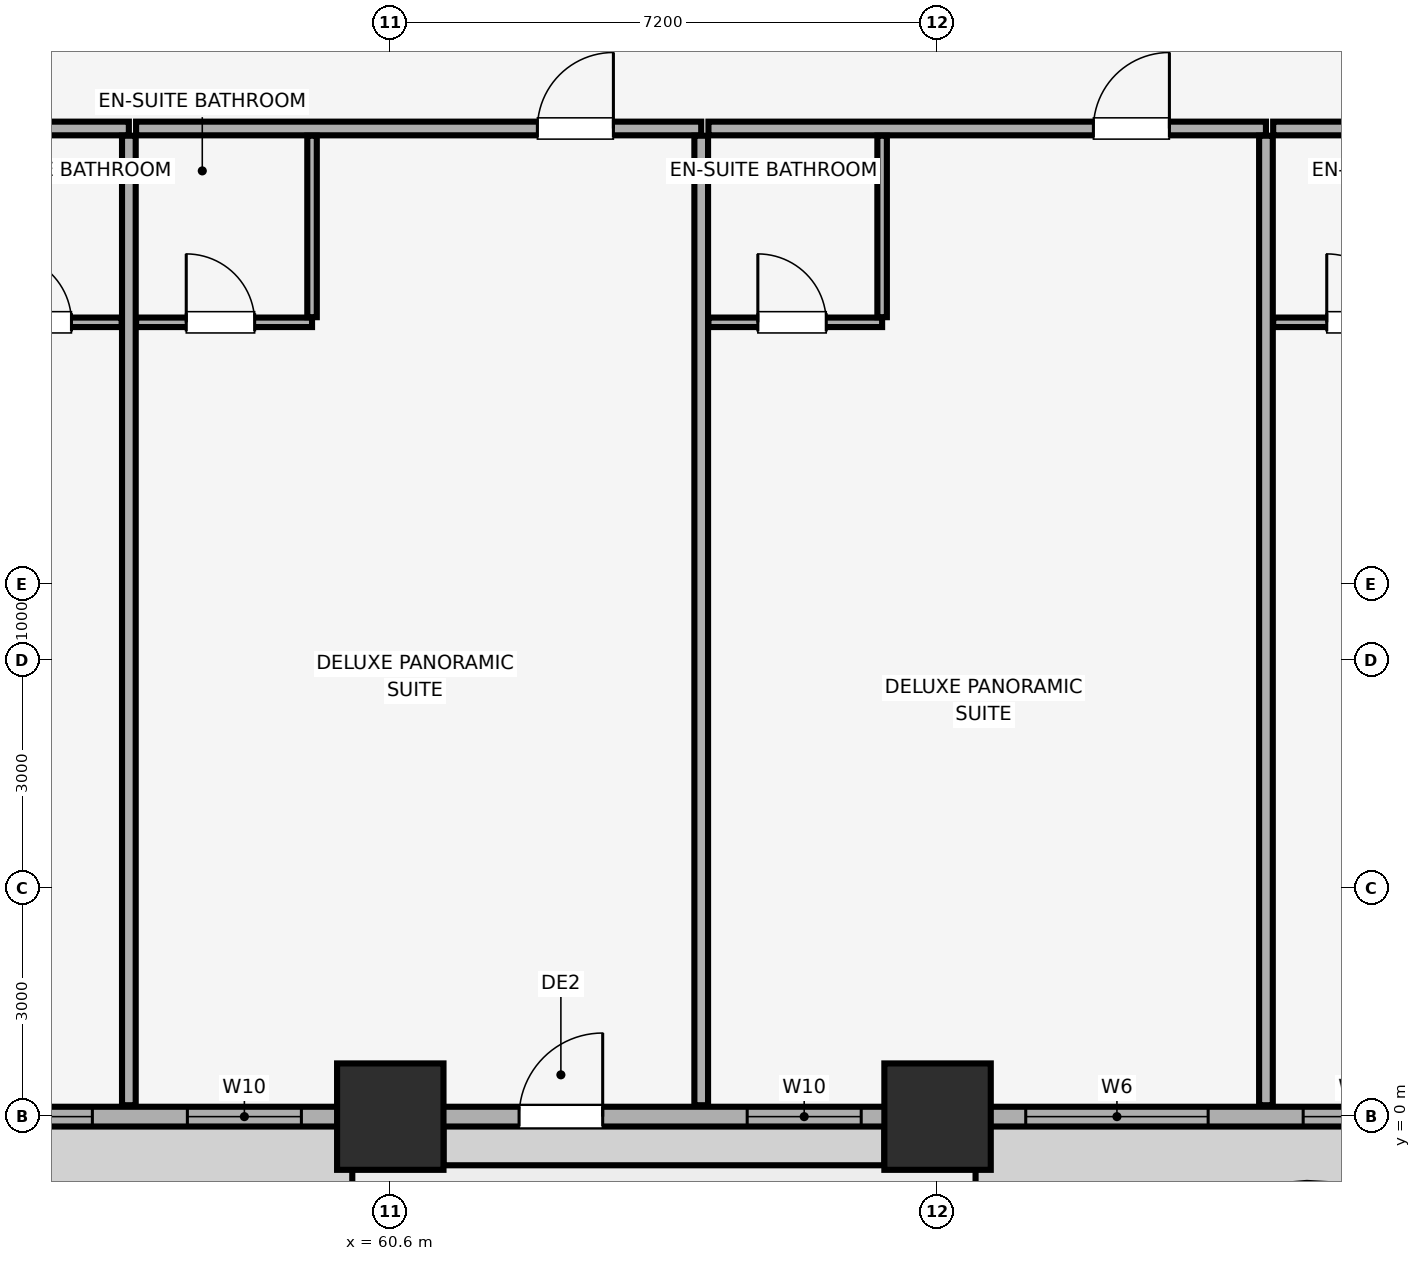
"""IFC4 building model, lengths in metres.
Left out: names, types, materials, properties, quantities, classifications, styles, units other than length and angle.
Written with IfcOpenShell. Run it as: python <this file> out.ifc"""

import sys

from ifc_helpers import new_model, si_unit, direction, frame, frame_2d, origin, origin_2d, place, context, subcontext, project, spatial, rectangle, extrude, element, fill, save


model = new_model("IFC4")
c1 = context("Model", 3, precision=1e-05, world=origin(), true_north=direction((0.0, 1.0)))
c2 = subcontext(c1, "Body", "Model", "MODEL_VIEW")
j1 = project(units=[si_unit("LENGTHUNIT", "METRE"), si_unit("PLANEANGLEUNIT", "RADIAN")], contexts=[c1])
p1 = place(None, origin())
s1 = spatial("IfcSite", under=j1, at=p1, CompositionType="ELEMENT")
p2 = place(p1, origin())
s2 = spatial("IfcBuilding", under=s1, at=p2, CompositionType="ELEMENT")
p3 = place(p2, frame((0.0, 0.0, 68.9)))
s3 = spatial("IfcBuildingStorey", under=s2, at=p3, CompositionType="ELEMENT", Elevation=68.9)
for number, where, z_axis, x_axis in (
    (1, (60.6, 0.0, 0.0), (0.0, 0.0, 1.0), (1.0, 0.0, 0.0)),
    (2, (67.8, 0.0, 0.0), (0.0, 0.0, 1.0), (1.0, 0.0, 0.0)),
):
    element("IfcColumn", number, at=place(p3, frame(where, z_axis=z_axis, x_axis=x_axis)), inside=s3, PredefinedType="COLUMN", context=c2, shape_type="SweptSolid", body=[
        extrude(rectangle(XDim=1.4, YDim=1.4, at=origin_2d()), origin(), (0.0, 0.0, 1.0), 3.51),
    ])
p4 = place(p3, frame((4.2, 0.0, 0.0), z_axis=(0.0, 0.0, 1.0), x_axis=(1.0, 0.0, 0.0)))
e3 = element("IfcWall", 3, at=p4, inside=s3, PredefinedType="SOLIDWALL", context=c2, shape_type="SweptSolid", body=[
    extrude(rectangle(XDim=75.6, YDim=0.26, at=frame_2d((37.8, 0.0))), origin(), (0.0, 0.0, 1.0), 2.56),
])
p5 = place(p4, frame((13.517, 0.0, 0.0)))
e4 = element("IfcOpeningElement", 4, at=p5, cuts=e3, PredefinedType="OPENING", context=c2, shape_type="SweptSolid", body=[
    extrude(rectangle(XDim=1.1, YDim=2.15, at=frame_2d((0.55, 1.075))), frame((0.0, 0.14, 0.0), z_axis=(0.0, -1.0, 0.0), x_axis=(1.0, 0.0, 0.0)), (0.0, 0.0, 1.0), 0.28),
])
p6 = place(p4, frame((28.183, 0.0, 0.0)))
e5 = element("IfcOpeningElement", 5, at=p6, cuts=e3, PredefinedType="OPENING", context=c2, shape_type="SweptSolid", body=[
    extrude(rectangle(XDim=1.1, YDim=2.15, at=frame_2d((0.55, 1.075))), frame((0.0, 0.14, 0.0), z_axis=(0.0, -1.0, 0.0), x_axis=(1.0, 0.0, 0.0)), (0.0, 0.0, 1.0), 0.28),
])
p7 = place(p4, frame((58.094, 0.0, 0.0)))
e6 = element("IfcOpeningElement", 6, at=p7, cuts=e3, PredefinedType="OPENING", context=c2, shape_type="SweptSolid", body=[
    extrude(rectangle(XDim=1.1, YDim=2.15, at=frame_2d((0.55, 1.075))), frame((0.0, 0.14, 0.0), z_axis=(0.0, -1.0, 0.0), x_axis=(1.0, 0.0, 0.0)), (0.0, 0.0, 1.0), 0.28),
])
p8 = place(p4, frame((1.035, 0.0, 0.85)))
e7 = element("IfcOpeningElement", 7, at=p8, cuts=e3, PredefinedType="OPENING", context=c2, shape_type="SweptSolid", body=[
    extrude(rectangle(XDim=2.4, YDim=1.5, at=frame_2d((1.2, 0.75))), frame((0.0, 0.14, 0.0), z_axis=(0.0, -1.0, 0.0), x_axis=(1.0, 0.0, 0.0)), (0.0, 0.0, 1.0), 0.28),
])
p9 = place(p4, frame((5.74, 0.0, 0.85)))
e8 = element("IfcOpeningElement", 8, at=p9, cuts=e3, PredefinedType="OPENING", context=c2, shape_type="SweptSolid", body=[
    extrude(rectangle(XDim=1.5, YDim=1.4, at=frame_2d((0.75, 0.7))), frame((0.0, 0.14, 0.0), z_axis=(0.0, -1.0, 0.0), x_axis=(1.0, 0.0, 0.0)), (0.0, 0.0, 1.0), 0.28),
])
p10 = place(p4, frame((8.49, 0.0, 0.85)))
e9 = element("IfcOpeningElement", 9, at=p10, cuts=e3, PredefinedType="OPENING", context=c2, shape_type="SweptSolid", body=[
    extrude(rectangle(XDim=2.4, YDim=1.5, at=frame_2d((1.2, 0.75))), frame((0.0, 0.14, 0.0), z_axis=(0.0, -1.0, 0.0), x_axis=(1.0, 0.0, 0.0)), (0.0, 0.0, 1.0), 0.28),
])
p11 = place(p4, frame((15.855, 0.0, 0.85)))
e10 = element("IfcOpeningElement", 10, at=p11, cuts=e3, PredefinedType="OPENING", context=c2, shape_type="SweptSolid", body=[
    extrude(rectangle(XDim=2.4, YDim=1.5, at=frame_2d((1.2, 0.75))), frame((0.0, 0.14, 0.0), z_axis=(0.0, -1.0, 0.0), x_axis=(1.0, 0.0, 0.0)), (0.0, 0.0, 1.0), 0.28),
])
p12 = place(p4, frame((20.02, 0.0, 0.85)))
e11 = element("IfcOpeningElement", 11, at=p12, cuts=e3, PredefinedType="OPENING", context=c2, shape_type="SweptSolid", body=[
    extrude(rectangle(XDim=2.4, YDim=1.5, at=frame_2d((1.2, 0.75))), frame((0.0, 0.14, 0.0), z_axis=(0.0, -1.0, 0.0), x_axis=(1.0, 0.0, 0.0)), (0.0, 0.0, 1.0), 0.28),
])
p13 = place(p4, frame((23.67, 0.0, 0.85)))
e12 = element("IfcOpeningElement", 12, at=p13, cuts=e3, PredefinedType="OPENING", context=c2, shape_type="SweptSolid", body=[
    extrude(rectangle(XDim=1.5, YDim=1.4, at=frame_2d((0.75, 0.7))), frame((0.0, 0.14, 0.0), z_axis=(0.0, -1.0, 0.0), x_axis=(1.0, 0.0, 0.0)), (0.0, 0.0, 1.0), 0.28),
])
p14 = place(p4, frame((31.035, 0.0, 0.85)))
e13 = element("IfcOpeningElement", 13, at=p14, cuts=e3, PredefinedType="OPENING", context=c2, shape_type="SweptSolid", body=[
    extrude(rectangle(XDim=1.5, YDim=1.4, at=frame_2d((0.75, 0.7))), frame((0.0, 0.14, 0.0), z_axis=(0.0, -1.0, 0.0), x_axis=(1.0, 0.0, 0.0)), (0.0, 0.0, 1.0), 0.28),
])
p15 = place(p4, frame((34.75, 0.0, 0.85)))
e14 = element("IfcOpeningElement", 14, at=p15, cuts=e3, PredefinedType="OPENING", context=c2, shape_type="SweptSolid", body=[
    extrude(rectangle(XDim=2.4, YDim=1.5, at=frame_2d((1.2, 0.75))), frame((0.0, 0.14, 0.0), z_axis=(0.0, -1.0, 0.0), x_axis=(1.0, 0.0, 0.0)), (0.0, 0.0, 1.0), 0.28),
])
p16 = place(p4, frame((38.55, 0.0, 0.85)))
e15 = element("IfcOpeningElement", 15, at=p16, cuts=e3, PredefinedType="OPENING", context=c2, shape_type="SweptSolid", body=[
    extrude(rectangle(XDim=2.4, YDim=1.5, at=frame_2d((1.2, 0.75))), frame((0.0, 0.14, 0.0), z_axis=(0.0, -1.0, 0.0), x_axis=(1.0, 0.0, 0.0)), (0.0, 0.0, 1.0), 0.28),
])
p17 = place(p4, frame((43.165, 0.0, 0.85)))
e16 = element("IfcOpeningElement", 16, at=p17, cuts=e3, PredefinedType="OPENING", context=c2, shape_type="SweptSolid", body=[
    extrude(rectangle(XDim=1.5, YDim=1.4, at=frame_2d((0.75, 0.7))), frame((0.0, 0.14, 0.0), z_axis=(0.0, -1.0, 0.0), x_axis=(1.0, 0.0, 0.0)), (0.0, 0.0, 1.0), 0.28),
])
p18 = place(p4, frame((45.915, 0.0, 0.85)))
e17 = element("IfcOpeningElement", 17, at=p18, cuts=e3, PredefinedType="OPENING", context=c2, shape_type="SweptSolid", body=[
    extrude(rectangle(XDim=2.4, YDim=1.5, at=frame_2d((1.2, 0.75))), frame((0.0, 0.14, 0.0), z_axis=(0.0, -1.0, 0.0), x_axis=(1.0, 0.0, 0.0)), (0.0, 0.0, 1.0), 0.28),
])
p19 = place(p4, frame((50.081, 0.0, 0.85)))
e18 = element("IfcOpeningElement", 18, at=p19, cuts=e3, PredefinedType="OPENING", context=c2, shape_type="SweptSolid", body=[
    extrude(rectangle(XDim=2.4, YDim=1.5, at=frame_2d((1.2, 0.75))), frame((0.0, 0.14, 0.0), z_axis=(0.0, -1.0, 0.0), x_axis=(1.0, 0.0, 0.0)), (0.0, 0.0, 1.0), 0.28),
])
p20 = place(p4, frame((53.73, 0.0, 0.85)))
e19 = element("IfcOpeningElement", 19, at=p20, cuts=e3, PredefinedType="OPENING", context=c2, shape_type="SweptSolid", body=[
    extrude(rectangle(XDim=1.5, YDim=1.4, at=frame_2d((0.75, 0.7))), frame((0.0, 0.14, 0.0), z_axis=(0.0, -1.0, 0.0), x_axis=(1.0, 0.0, 0.0)), (0.0, 0.0, 1.0), 0.28),
])
p21 = place(p4, frame((61.095, 0.0, 0.85)))
e20 = element("IfcOpeningElement", 20, at=p21, cuts=e3, PredefinedType="OPENING", context=c2, shape_type="SweptSolid", body=[
    extrude(rectangle(XDim=1.5, YDim=1.4, at=frame_2d((0.75, 0.7))), frame((0.0, 0.14, 0.0), z_axis=(0.0, -1.0, 0.0), x_axis=(1.0, 0.0, 0.0)), (0.0, 0.0, 1.0), 0.28),
])
p22 = place(p4, frame((64.76, 0.0, 0.85)))
e21 = element("IfcOpeningElement", 21, at=p22, cuts=e3, PredefinedType="OPENING", context=c2, shape_type="SweptSolid", body=[
    extrude(rectangle(XDim=2.4, YDim=1.5, at=frame_2d((1.2, 0.75))), frame((0.0, 0.14, 0.0), z_axis=(0.0, -1.0, 0.0), x_axis=(1.0, 0.0, 0.0)), (0.0, 0.0, 1.0), 0.28),
])
p23 = place(p4, frame((68.41, 0.0, 0.85)))
e22 = element("IfcOpeningElement", 22, at=p23, cuts=e3, PredefinedType="OPENING", context=c2, shape_type="SweptSolid", body=[
    extrude(rectangle(XDim=1.5, YDim=1.4, at=frame_2d((0.75, 0.7))), frame((0.0, 0.14, 0.0), z_axis=(0.0, -1.0, 0.0), x_axis=(1.0, 0.0, 0.0)), (0.0, 0.0, 1.0), 0.28),
])
p24 = place(p4, frame((72.165, 0.0, 0.85)))
e23 = element("IfcOpeningElement", 23, at=p24, cuts=e3, PredefinedType="OPENING", context=c2, shape_type="SweptSolid", body=[
    extrude(rectangle(XDim=2.4, YDim=1.5, at=frame_2d((1.2, 0.75))), frame((0.0, 0.14, 0.0), z_axis=(0.0, -1.0, 0.0), x_axis=(1.0, 0.0, 0.0)), (0.0, 0.0, 1.0), 0.28),
])
p25 = place(p3, frame((49.726, 13.0, 0.0), z_axis=(0.0, 0.0, 1.0), x_axis=(1.0, 0.0, 0.0)))
e24 = element("IfcWall", 24, at=p25, inside=s3, PredefinedType="PARTITIONING", context=c2, shape_type="SweptSolid", body=[
    extrude(rectangle(XDim=7.435, YDim=0.18, at=frame_2d((3.718, 0.0))), origin(), (0.0, 0.0, 1.0), 3.51),
])
p26 = place(p25, frame((0.9, 0.0, 0.0)))
e25 = element("IfcOpeningElement", 25, at=p26, cuts=e24, PredefinedType="OPENING", context=c2, shape_type="SweptSolid", body=[
    extrude(rectangle(XDim=1.0, YDim=2.15, at=frame_2d((0.5, 1.075))), frame((0.0, 0.1, 0.0), z_axis=(0.0, -1.0, 0.0), x_axis=(1.0, 0.0, 0.0)), (0.0, 0.0, 1.0), 0.2),
])
p27 = place(p3, frame((57.161, 0.15, 0.0), z_axis=(0.0, 0.0, 1.0), x_axis=(0.0, 1.0, 0.0)))
e26 = element("IfcWall", 26, at=p27, inside=s3, PredefinedType="PARTITIONING", context=c2, shape_type="SweptSolid", body=[
    extrude(rectangle(XDim=12.755, YDim=0.18, at=frame_2d((6.377, 0.0))), origin(), (0.0, 0.0, 1.0), 2.898),
])
p28 = place(p3, frame((54.75, 10.45, 0.0), z_axis=(0.0, 0.0, 1.0), x_axis=(1.0, 0.0, 0.0)))
e27 = element("IfcWall", 27, at=p28, inside=s3, PredefinedType="PARTITIONING", context=c2, shape_type="SweptSolid", body=[
    extrude(rectangle(XDim=2.315, YDim=0.125, at=frame_2d((1.158, 0.0))), origin(), (0.0, 0.0, 1.0), 3.51),
])
p29 = place(p28, frame((0.755, 0.0, 0.0)))
e28 = element("IfcOpeningElement", 28, at=p29, cuts=e27, PredefinedType="OPENING", context=c2, shape_type="SweptSolid", body=[
    extrude(rectangle(XDim=0.9, YDim=2.1, at=frame_2d((0.45, 1.05))), frame((0.0, 0.073, 0.0), z_axis=(0.0, -1.0, 0.0), x_axis=(1.0, 0.0, 0.0)), (0.0, 0.0, 1.0), 0.145),
])
p30 = place(p3, frame((57.256, 13.0, 0.0), z_axis=(0.0, 0.0, 1.0), x_axis=(1.0, 0.0, 0.0)))
e29 = element("IfcWall", 29, at=p30, inside=s3, PredefinedType="PARTITIONING", context=c2, shape_type="SweptSolid", body=[
    extrude(rectangle(XDim=7.435, YDim=0.18, at=frame_2d((3.718, 0.0))), origin(), (0.0, 0.0, 1.0), 3.51),
])
p31 = place(p30, frame((5.28, 0.0, 0.0)))
e30 = element("IfcOpeningElement", 30, at=p31, cuts=e29, PredefinedType="OPENING", context=c2, shape_type="SweptSolid", body=[
    extrude(rectangle(XDim=1.0, YDim=2.15, at=frame_2d((0.5, 1.075))), frame((0.0, 0.1, 0.0), z_axis=(0.0, -1.0, 0.0), x_axis=(1.0, 0.0, 0.0)), (0.0, 0.0, 1.0), 0.2),
])
p32 = place(p3, frame((64.691, 0.15, 0.0), z_axis=(0.0, 0.0, 1.0), x_axis=(0.0, 1.0, 0.0)))
e31 = element("IfcWall", 31, at=p32, inside=s3, PredefinedType="PARTITIONING", context=c2, shape_type="SweptSolid", body=[
    extrude(rectangle(XDim=12.755, YDim=0.18, at=frame_2d((6.377, 0.0))), origin(), (0.0, 0.0, 1.0), 3.51),
])
p33 = place(p3, frame((57.256, 10.45, 0.0), z_axis=(0.0, 0.0, 1.0), x_axis=(1.0, 0.0, 0.0)))
e32 = element("IfcWall", 32, at=p33, inside=s3, PredefinedType="PARTITIONING", context=c2, shape_type="SweptSolid", body=[
    extrude(rectangle(XDim=2.315, YDim=0.125, at=frame_2d((1.157, 0.0))), origin(), (0.0, 0.0, 1.0), 3.51),
])
p34 = place(p33, frame((0.66, 0.0, 0.0)))
e33 = element("IfcOpeningElement", 33, at=p34, cuts=e32, PredefinedType="OPENING", context=c2, shape_type="SweptSolid", body=[
    extrude(rectangle(XDim=0.9, YDim=2.1, at=frame_2d((0.45, 1.05))), frame((0.0, 0.073, 0.0), z_axis=(0.0, -1.0, 0.0), x_axis=(1.0, 0.0, 0.0)), (0.0, 0.0, 1.0), 0.145),
])
p35 = place(p3, frame((59.571, 10.518, 0.0), z_axis=(0.0, 0.0, 1.0), x_axis=(0.0, 1.0, 0.0)))
e34 = element("IfcWall", 34, at=p35, inside=s3, PredefinedType="PARTITIONING", context=c2, shape_type="SweptSolid", body=[
    extrude(rectangle(XDim=2.387, YDim=0.125, at=frame_2d((1.194, 0.0))), origin(), (0.0, 0.0, 1.0), 3.51),
])
p36 = place(p3, frame((64.786, 13.0, 0.0), z_axis=(0.0, 0.0, 1.0), x_axis=(1.0, 0.0, 0.0)))
e35 = element("IfcWall", 35, at=p36, inside=s3, PredefinedType="PARTITIONING", context=c2, shape_type="SweptSolid", body=[
    extrude(rectangle(XDim=7.335, YDim=0.18, at=frame_2d((3.667, 0.0))), origin(), (0.0, 0.0, 1.0), 3.51),
])
p37 = place(p36, frame((5.064, 0.0, 0.0)))
e36 = element("IfcOpeningElement", 36, at=p37, cuts=e35, PredefinedType="OPENING", context=c2, shape_type="SweptSolid", body=[
    extrude(rectangle(XDim=1.0, YDim=2.15, at=frame_2d((0.5, 1.075))), frame((0.0, 0.1, 0.0), z_axis=(0.0, -1.0, 0.0), x_axis=(1.0, 0.0, 0.0)), (0.0, 0.0, 1.0), 0.2),
])
p38 = place(p3, frame((72.12, 0.15, 0.0), z_axis=(0.0, 0.0, 1.0), x_axis=(0.0, 1.0, 0.0)))
e37 = element("IfcWall", 37, at=p38, inside=s3, PredefinedType="PARTITIONING", context=c2, shape_type="SweptSolid", body=[
    extrude(rectangle(XDim=12.755, YDim=0.18, at=frame_2d((6.377, 0.0))), origin(), (0.0, 0.0, 1.0), 3.51),
])
p39 = place(p3, frame((64.786, 10.45, 0.0), z_axis=(0.0, 0.0, 1.0), x_axis=(1.0, 0.0, 0.0)))
e38 = element("IfcWall", 38, at=p39, inside=s3, PredefinedType="PARTITIONING", context=c2, shape_type="SweptSolid", body=[
    extrude(rectangle(XDim=2.285, YDim=0.125, at=frame_2d((1.143, 0.0))), origin(), (0.0, 0.0, 1.0), 3.51),
])
p40 = place(p39, frame((0.65, 0.0, 0.0)))
e39 = element("IfcOpeningElement", 39, at=p40, cuts=e38, PredefinedType="OPENING", context=c2, shape_type="SweptSolid", body=[
    extrude(rectangle(XDim=0.9, YDim=2.1, at=frame_2d((0.45, 1.05))), frame((0.0, 0.073, 0.0), z_axis=(0.0, -1.0, 0.0), x_axis=(1.0, 0.0, 0.0)), (0.0, 0.0, 1.0), 0.145),
])
p41 = place(p3, frame((67.071, 10.518, 0.0), z_axis=(0.0, 0.0, 1.0), x_axis=(0.0, 1.0, 0.0)))
e40 = element("IfcWall", 40, at=p41, inside=s3, PredefinedType="PARTITIONING", context=c2, shape_type="SweptSolid", body=[
    extrude(rectangle(XDim=2.387, YDim=0.125, at=frame_2d((1.194, 0.0))), origin(), (0.0, 0.0, 1.0), 3.51),
])
p42 = place(p3, frame((72.215, 13.0, 0.0), z_axis=(0.0, 0.0, 1.0), x_axis=(1.0, 0.0, 0.0)))
e41 = element("IfcWall", 41, at=p42, inside=s3, PredefinedType="PARTITIONING", context=c2, shape_type="SweptSolid", body=[
    extrude(rectangle(XDim=11.635, YDim=0.18, at=frame_2d((5.817, 0.0))), origin(), (0.0, 0.0, 1.0), 3.51),
])
p43 = place(p42, frame((4.95, 0.0, 0.0)))
e42 = element("IfcOpeningElement", 42, at=p43, cuts=e41, PredefinedType="OPENING", context=c2, shape_type="SweptSolid", body=[
    extrude(rectangle(XDim=1.0, YDim=2.15, at=frame_2d((0.5, 1.075))), frame((0.0, 0.1, 0.0), z_axis=(0.0, -1.0, 0.0), x_axis=(1.0, 0.0, 0.0)), (0.0, 0.0, 1.0), 0.2),
])
p44 = place(p3, frame((72.215, 10.45, 0.0), z_axis=(0.0, 0.0, 1.0), x_axis=(1.0, 0.0, 0.0)))
e43 = element("IfcWall", 43, at=p44, inside=s3, PredefinedType="PARTITIONING", context=c2, shape_type="SweptSolid", body=[
    extrude(rectangle(XDim=2.405, YDim=0.125, at=frame_2d((1.203, 0.0))), origin(), (0.0, 0.0, 1.0), 3.51),
])
p45 = place(p44, frame((0.705, 0.0, 0.0)))
e44 = element("IfcOpeningElement", 44, at=p45, cuts=e43, PredefinedType="OPENING", context=c2, shape_type="SweptSolid", body=[
    extrude(rectangle(XDim=0.9, YDim=2.1, at=frame_2d((0.45, 1.05))), frame((0.0, 0.073, 0.0), z_axis=(0.0, -1.0, 0.0), x_axis=(1.0, 0.0, 0.0)), (0.0, 0.0, 1.0), 0.145),
])
p46 = place(p7, origin())
e45 = element("IfcDoor", 45, at=p46, inside=s3, OperationType="SINGLE_SWING_RIGHT", PredefinedType="DOOR", context=c2, shape_type="SweptSolid", body=[
    extrude(rectangle(XDim=1.1, YDim=2.15, at=frame_2d((0.55, 1.075))), frame((0.0, 0.025, 0.0), z_axis=(0.0, -1.0, 0.0), x_axis=(1.0, 0.0, 0.0)), (0.0, 0.0, 1.0), 0.05),
])
fill(e6, e45)
p47 = place(p19, origin())
e46 = element("IfcWindow", 46, at=p47, inside=s3, PartitioningType="SINGLE_PANEL", PredefinedType="WINDOW", context=c2, shape_type="SweptSolid", body=[
    extrude(rectangle(XDim=2.4, YDim=1.5, at=frame_2d((1.2, 0.75))), frame((0.0, 0.03, 0.0), z_axis=(0.0, -1.0, 0.0), x_axis=(1.0, 0.0, 0.0)), (0.0, 0.0, 1.0), 0.06),
])
fill(e18, e46)
p48 = place(p20, origin())
e47 = element("IfcWindow", 47, at=p48, inside=s3, PartitioningType="SINGLE_PANEL", PredefinedType="WINDOW", context=c2, shape_type="SweptSolid", body=[
    extrude(rectangle(XDim=1.5, YDim=1.4, at=frame_2d((0.75, 0.7))), frame((0.0, 0.03, 0.0), z_axis=(0.0, -1.0, 0.0), x_axis=(1.0, 0.0, 0.0)), (0.0, 0.0, 1.0), 0.06),
])
fill(e19, e47)
p49 = place(p21, origin())
e48 = element("IfcWindow", 48, at=p49, inside=s3, PartitioningType="SINGLE_PANEL", PredefinedType="WINDOW", context=c2, shape_type="SweptSolid", body=[
    extrude(rectangle(XDim=1.5, YDim=1.4, at=frame_2d((0.75, 0.7))), frame((0.0, 0.03, 0.0), z_axis=(0.0, -1.0, 0.0), x_axis=(1.0, 0.0, 0.0)), (0.0, 0.0, 1.0), 0.06),
])
fill(e20, e48)
p50 = place(p22, origin())
e49 = element("IfcWindow", 49, at=p50, inside=s3, PartitioningType="SINGLE_PANEL", PredefinedType="WINDOW", context=c2, shape_type="SweptSolid", body=[
    extrude(rectangle(XDim=2.4, YDim=1.5, at=frame_2d((1.2, 0.75))), frame((0.0, 0.03, 0.0), z_axis=(0.0, -1.0, 0.0), x_axis=(1.0, 0.0, 0.0)), (0.0, 0.0, 1.0), 0.06),
])
fill(e21, e49)
p51 = place(p23, origin())
e50 = element("IfcWindow", 50, at=p51, inside=s3, PartitioningType="SINGLE_PANEL", PredefinedType="WINDOW", context=c2, shape_type="SweptSolid", body=[
    extrude(rectangle(XDim=1.5, YDim=1.4, at=frame_2d((0.75, 0.7))), frame((0.0, 0.03, 0.0), z_axis=(0.0, -1.0, 0.0), x_axis=(1.0, 0.0, 0.0)), (0.0, 0.0, 1.0), 0.06),
])
fill(e22, e50)
p52 = place(p29, origin())
e51 = element("IfcDoor", 51, at=p52, inside=s3, OperationType="SINGLE_SWING_LEFT", PredefinedType="DOOR", context=c2, shape_type="SweptSolid", body=[
    extrude(rectangle(XDim=0.9, YDim=2.1, at=frame_2d((0.45, 1.05))), frame((0.0, 0.025, 0.0), z_axis=(0.0, -1.0, 0.0), x_axis=(1.0, 0.0, 0.0)), (0.0, 0.0, 1.0), 0.05),
])
fill(e28, e51)
p53 = place(p31, origin())
e52 = element("IfcDoor", 52, at=p53, inside=s3, OperationType="SINGLE_SWING_RIGHT", PredefinedType="DOOR", context=c2, shape_type="SweptSolid", body=[
    extrude(rectangle(XDim=1.0, YDim=2.15, at=frame_2d((0.5, 1.075))), frame((0.0, 0.025, 0.0), z_axis=(0.0, -1.0, 0.0), x_axis=(1.0, 0.0, 0.0)), (0.0, 0.0, 1.0), 0.05),
])
fill(e30, e52)
p54 = place(p34, origin())
e53 = element("IfcDoor", 53, at=p54, inside=s3, OperationType="SINGLE_SWING_LEFT", PredefinedType="DOOR", context=c2, shape_type="SweptSolid", body=[
    extrude(rectangle(XDim=0.9, YDim=2.1, at=frame_2d((0.45, 1.05))), frame((0.0, 0.025, 0.0), z_axis=(0.0, -1.0, 0.0), x_axis=(1.0, 0.0, 0.0)), (0.0, 0.0, 1.0), 0.05),
])
fill(e33, e53)
p55 = place(p37, origin())
e54 = element("IfcDoor", 54, at=p55, inside=s3, OperationType="SINGLE_SWING_RIGHT", PredefinedType="DOOR", context=c2, shape_type="SweptSolid", body=[
    extrude(rectangle(XDim=1.0, YDim=2.15, at=frame_2d((0.5, 1.075))), frame((0.0, 0.025, 0.0), z_axis=(0.0, -1.0, 0.0), x_axis=(1.0, 0.0, 0.0)), (0.0, 0.0, 1.0), 0.05),
])
fill(e36, e54)
p56 = place(p40, origin())
e55 = element("IfcDoor", 55, at=p56, inside=s3, OperationType="SINGLE_SWING_LEFT", PredefinedType="DOOR", context=c2, shape_type="SweptSolid", body=[
    extrude(rectangle(XDim=0.9, YDim=2.1, at=frame_2d((0.45, 1.05))), frame((0.0, 0.025, 0.0), z_axis=(0.0, -1.0, 0.0), x_axis=(1.0, 0.0, 0.0)), (0.0, 0.0, 1.0), 0.05),
])
fill(e39, e55)
p57 = place(p45, origin())
e56 = element("IfcDoor", 56, at=p57, inside=s3, OperationType="SINGLE_SWING_LEFT", PredefinedType="DOOR", context=c2, shape_type="SweptSolid", body=[
    extrude(rectangle(XDim=0.9, YDim=2.1, at=frame_2d((0.45, 1.05))), frame((0.0, 0.025, 0.0), z_axis=(0.0, -1.0, 0.0), x_axis=(1.0, 0.0, 0.0)), (0.0, 0.0, 1.0), 0.05),
])
fill(e44, e56)
save(model, sys.argv[1])
